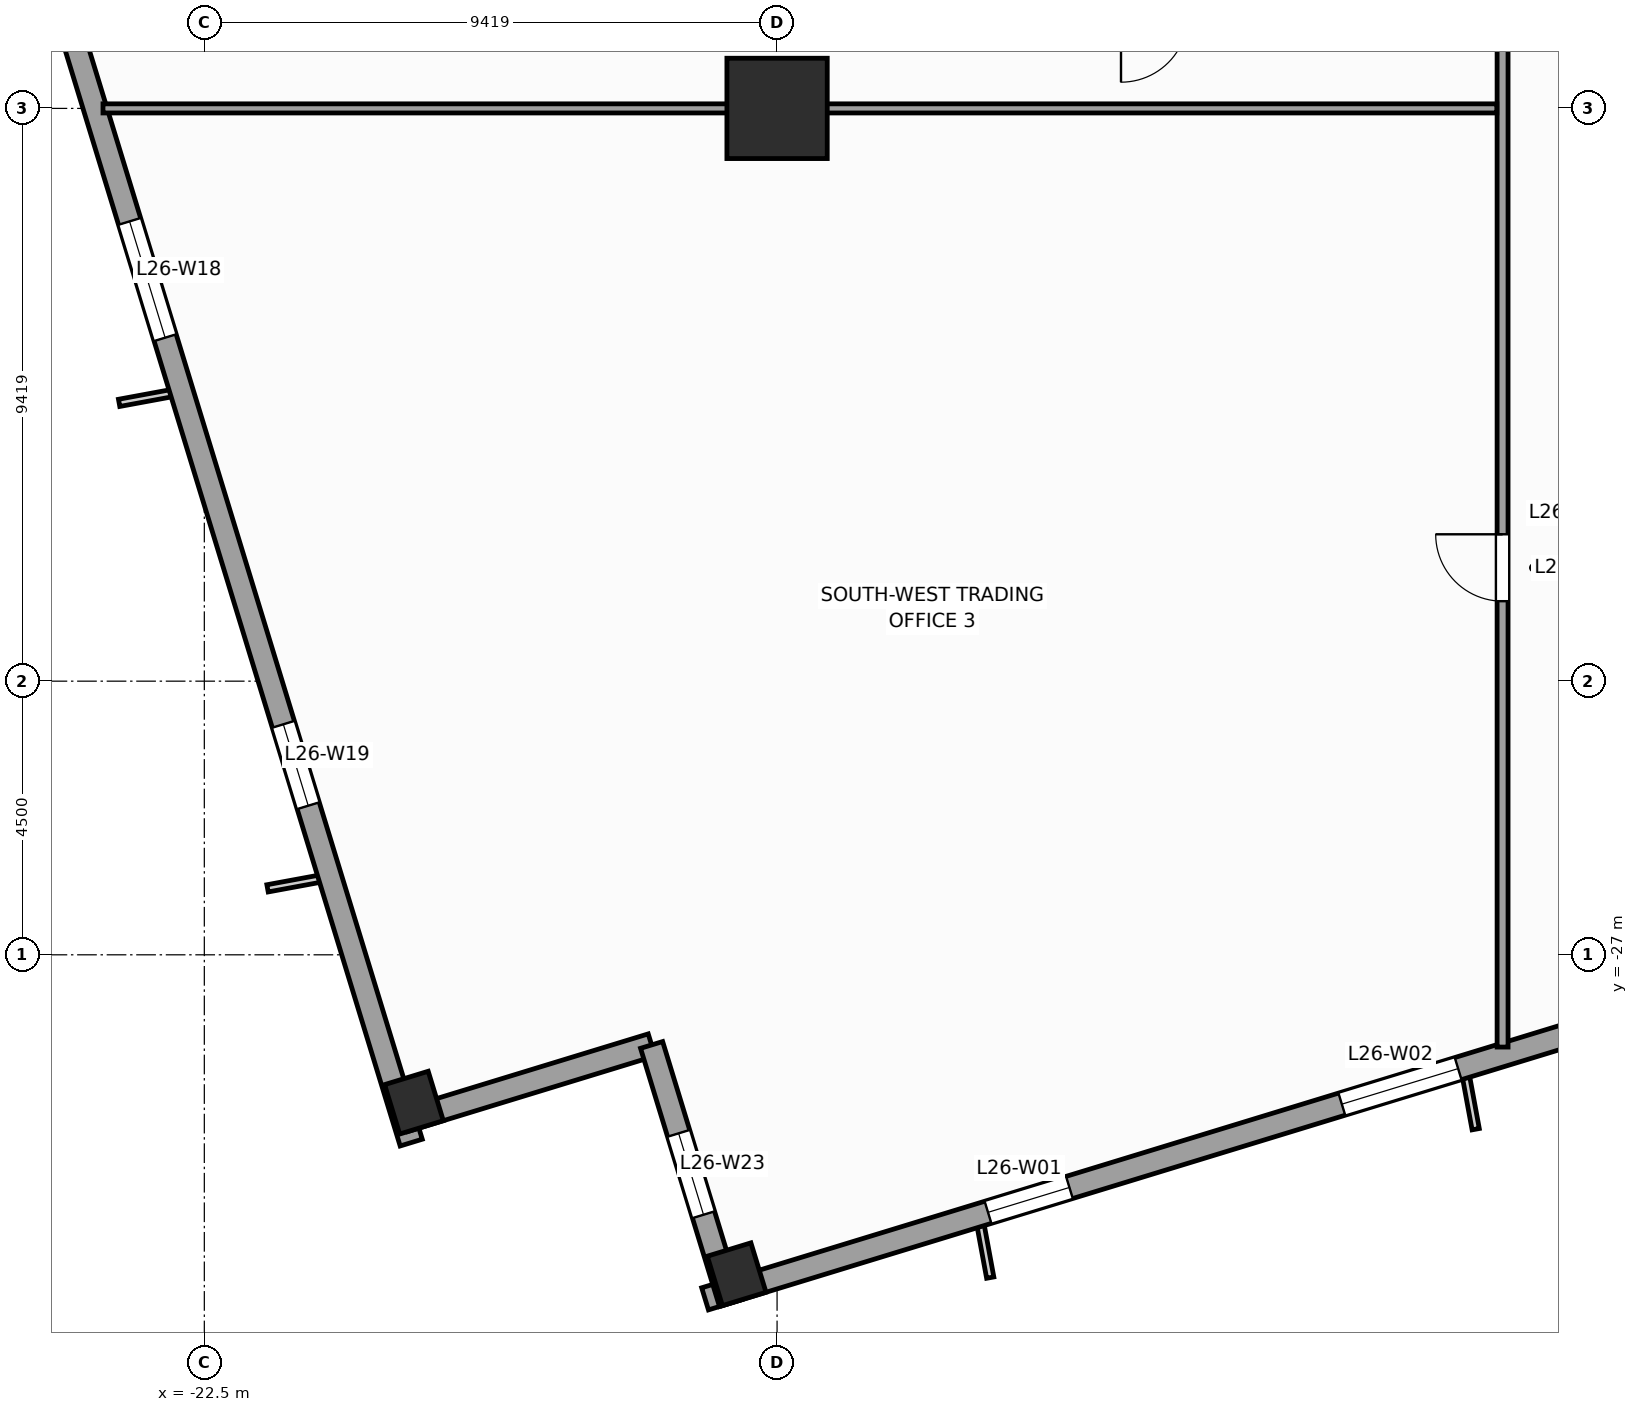
"""IFC4 building model, lengths in metres.
Left out: names, types, materials, properties, quantities, classifications, styles, units other than length and angle.
Written with IfcOpenShell. Run it as: python <this file> out.ifc"""

import sys

from ifc_helpers import new_model, si_unit, direction, frame, frame_2d, origin, origin_2d, place, context, subcontext, project, spatial, rectangle, extrude, source, transform, mapped, element, fill, save


model = new_model("IFC4")
c1 = context("Model", 3, precision=1e-05, world=origin(), true_north=direction((0.0, 1.0)))
c2 = subcontext(c1, "Body", "Model", "MODEL_VIEW")
j1 = project(units=[si_unit("LENGTHUNIT", "METRE"), si_unit("PLANEANGLEUNIT", "RADIAN")], contexts=[c1])
p1 = place(None, origin())
s1 = spatial("IfcSite", under=j1, at=p1, CompositionType="ELEMENT")
p2 = place(p1, origin())
s2 = spatial("IfcBuilding", under=s1, at=p2, CompositionType="ELEMENT")
p3 = place(p2, frame((0.0, 0.0, 111.2)))
s3 = spatial("IfcBuildingStorey", under=s2, at=p3, CompositionType="ELEMENT", Elevation=111.2)
m1 = source(origin(), c2, "Body", "SweptSolid", [
    extrude(rectangle(XDim=1.65, YDim=1.65, at=origin_2d()), origin(), (0.0, 0.0, 1.0), 4.0),
])
p4 = place(p3, frame((-13.081, -13.081, 0.0), z_axis=(0.0, 0.0, 1.0), x_axis=(1.0, 0.0, 0.0)))
e1 = element("IfcColumn", 1, at=p4, inside=s3, PredefinedType="COLUMN", context=c2, shape_type="MappedRepresentation", body=[
    mapped(m1, transform((0.0, 0.0, 0.0), scale=1.0)),
])
m2 = source(origin(), c2, "Body", "SweptSolid", [
    extrude(rectangle(XDim=0.75, YDim=0.85, at=origin_2d()), origin(), (0.0, 0.0, 1.0), 4.0),
])
for number, where, z_axis, x_axis in (
    (2, (-13.746, -32.253, 0.0), (0.0, 0.0, 1.0), (0.956, 0.292, 0.0)),
    (3, (-19.052, -29.431, 0.0), (0.0, 0.0, 1.0), (0.956, 0.292, 0.0)),
):
    element("IfcColumn", number, at=place(p3, frame(where, z_axis=z_axis, x_axis=x_axis)), inside=s3, PredefinedType="COLUMN", context=c2, shape_type="MappedRepresentation", body=[
        mapped(m2, transform((0.0, 0.0, 0.0), scale=1.0)),
    ])
p5 = place(p3, frame((-14.265, -32.658, 0.0), z_axis=(0.0, 0.0, 1.0), x_axis=(0.956304320851, 0.292373127906, 0.0)))
e4 = element("IfcWall", 4, at=p5, inside=s3, PredefinedType="STANDARD", context=c2, shape_type="SweptSolid", body=[
    extrude(rectangle(XDim=46.38, YDim=0.38, at=frame_2d((23.19, 0.0))), origin(), (0.0, 0.0, 1.0), 3.14),
])
p6 = place(p5, frame((29.115, 0.0, 0.0)))
e5 = element("IfcOpeningElement", 5, at=p6, cuts=e4, PredefinedType="OPENING", context=c2, shape_type="SweptSolid", body=[
    extrude(rectangle(XDim=1.05, YDim=2.25, at=frame_2d((0.525, 1.125))), frame((0.0, 0.2, 0.0), z_axis=(0.0, -1.0, 0.0), x_axis=(1.0, 0.0, 0.0)), (0.0, 0.0, 1.0), 0.4),
])
p7 = place(p5, frame((4.865, 0.0, 0.51)))
e6 = element("IfcOpeningElement", 6, at=p7, cuts=e4, PredefinedType="OPENING", context=c2, shape_type="SweptSolid", body=[
    extrude(rectangle(XDim=1.4, YDim=2.4, at=frame_2d((0.7, 1.2))), frame((0.0, 0.2, 0.0), z_axis=(0.0, -1.0, 0.0), x_axis=(1.0, 0.0, 0.0)), (0.0, 0.0, 1.0), 0.4),
])
p8 = place(p5, frame((10.95, 0.0, 0.51)))
e7 = element("IfcOpeningElement", 7, at=p8, cuts=e4, PredefinedType="OPENING", context=c2, shape_type="SweptSolid", body=[
    extrude(rectangle(XDim=2.0, YDim=2.4, at=frame_2d((1.0, 1.2))), frame((0.0, 0.2, 0.0), z_axis=(0.0, -1.0, 0.0), x_axis=(1.0, 0.0, 0.0)), (0.0, 0.0, 1.0), 0.4),
])
p9 = place(p5, frame((20.512, 0.0, 0.51)))
e8 = element("IfcOpeningElement", 8, at=p9, cuts=e4, PredefinedType="OPENING", context=c2, shape_type="SweptSolid", body=[
    extrude(rectangle(XDim=2.0, YDim=2.4, at=frame_2d((1.0, 1.2))), frame((0.0, 0.2, 0.0), z_axis=(0.0, -1.0, 0.0), x_axis=(1.0, 0.0, 0.0)), (0.0, 0.0, 1.0), 0.4),
])
p10 = place(p5, frame((31.288, 0.0, 0.51)))
e9 = element("IfcOpeningElement", 9, at=p10, cuts=e4, PredefinedType="OPENING", context=c2, shape_type="SweptSolid", body=[
    extrude(rectangle(XDim=2.0, YDim=2.4, at=frame_2d((1.0, 1.2))), frame((0.0, 0.2, 0.0), z_axis=(0.0, -1.0, 0.0), x_axis=(1.0, 0.0, 0.0)), (0.0, 0.0, 1.0), 0.4),
])
p11 = place(p5, frame((39.187, 0.0, 0.51)))
e10 = element("IfcOpeningElement", 10, at=p11, cuts=e4, PredefinedType="OPENING", context=c2, shape_type="SweptSolid", body=[
    extrude(rectangle(XDim=1.4, YDim=2.4, at=frame_2d((0.7, 1.2))), frame((0.0, 0.2, 0.0), z_axis=(0.0, -1.0, 0.0), x_axis=(1.0, 0.0, 0.0)), (0.0, 0.0, 1.0), 0.4),
])
p12 = place(p3, frame((-32.658, 14.265, 0.0), z_axis=(0.0, 0.0, 1.0), x_axis=(0.292373127906, -0.956304320851, 0.0)))
e11 = element("IfcWall", 11, at=p12, inside=s3, PredefinedType="STANDARD", context=c2, shape_type="SweptSolid", body=[
    extrude(rectangle(XDim=46.38, YDim=0.38, at=frame_2d((23.19, 0.0))), origin(), (0.0, 0.0, 1.0), 3.14),
])
p13 = place(p12, frame((4.865, 0.0, 0.51)))
e12 = element("IfcOpeningElement", 12, at=p13, cuts=e11, PredefinedType="OPENING", context=c2, shape_type="SweptSolid", body=[
    extrude(rectangle(XDim=1.4, YDim=2.4, at=frame_2d((0.7, 1.2))), frame((0.0, 0.2, 0.0), z_axis=(0.0, -1.0, 0.0), x_axis=(1.0, 0.0, 0.0)), (0.0, 0.0, 1.0), 0.4),
])
p14 = place(p12, frame((14.7, 0.0, 0.51)))
e13 = element("IfcOpeningElement", 13, at=p14, cuts=e11, PredefinedType="OPENING", context=c2, shape_type="SweptSolid", body=[
    extrude(rectangle(XDim=2.0, YDim=2.4, at=frame_2d((1.0, 1.2))), frame((0.0, 0.2, 0.0), z_axis=(0.0, -1.0, 0.0), x_axis=(1.0, 0.0, 0.0)), (0.0, 0.0, 1.0), 0.4),
])
p15 = place(p12, frame((19.012, 0.0, 0.51)))
e14 = element("IfcOpeningElement", 14, at=p15, cuts=e11, PredefinedType="OPENING", context=c2, shape_type="SweptSolid", body=[
    extrude(rectangle(XDim=2.0, YDim=2.4, at=frame_2d((1.0, 1.2))), frame((0.0, 0.2, 0.0), z_axis=(0.0, -1.0, 0.0), x_axis=(1.0, 0.0, 0.0)), (0.0, 0.0, 1.0), 0.4),
])
p16 = place(p12, frame((30.538, 0.0, 0.51)))
e15 = element("IfcOpeningElement", 15, at=p16, cuts=e11, PredefinedType="OPENING", context=c2, shape_type="SweptSolid", body=[
    extrude(rectangle(XDim=2.0, YDim=2.4, at=frame_2d((1.0, 1.2))), frame((0.0, 0.2, 0.0), z_axis=(0.0, -1.0, 0.0), x_axis=(1.0, 0.0, 0.0)), (0.0, 0.0, 1.0), 0.4),
])
p17 = place(p12, frame((39.187, 0.0, 0.51)))
e16 = element("IfcOpeningElement", 16, at=p17, cuts=e11, PredefinedType="OPENING", context=c2, shape_type="SweptSolid", body=[
    extrude(rectangle(XDim=1.4, YDim=2.4, at=frame_2d((0.7, 1.2))), frame((0.0, 0.2, 0.0), z_axis=(0.0, -1.0, 0.0), x_axis=(1.0, 0.0, 0.0)), (0.0, 0.0, 1.0), 0.4),
])
p18 = place(p3, frame((-19.208, -29.725, 0.0), z_axis=(0.0, 0.0, 1.0), x_axis=(0.956312764915, 0.292345507338, 0.0)))
e17 = element("IfcWall", 17, at=p18, inside=s3, PredefinedType="STANDARD", context=c2, shape_type="SweptSolid", body=[
    extrude(rectangle(XDim=4.25, YDim=0.38, at=frame_2d((2.125, 0.0))), origin(), (0.0, 0.0, 1.0), 3.74),
])
p19 = place(p3, frame((-15.144, -28.482, 0.0), z_axis=(0.0, 0.0, 1.0), x_axis=(0.292373601522, -0.956304176051, 0.0)))
e18 = element("IfcWall", 18, at=p19, inside=s3, PredefinedType="STANDARD", context=c2, shape_type="SweptSolid", body=[
    extrude(rectangle(XDim=4.44, YDim=0.38, at=frame_2d((2.22, 0.0))), origin(), (0.0, 0.0, 1.0), 3.04),
])
p20 = place(p19, frame((1.52, 0.0, 0.51)))
e19 = element("IfcOpeningElement", 19, at=p20, cuts=e18, PredefinedType="OPENING", context=c2, shape_type="SweptSolid", body=[
    extrude(rectangle(XDim=1.4, YDim=2.4, at=frame_2d((0.7, 1.2))), frame((0.0, 0.2, 0.0), z_axis=(0.0, -1.0, 0.0), x_axis=(1.0, 0.0, 0.0)), (0.0, 0.0, 1.0), 0.4),
])
p21 = place(p3, frame((-1.15, -28.517, 0.0), z_axis=(0.0, 0.0, 1.0), x_axis=(0.0, 1.0, 0.0)))
e20 = element("IfcWall", 20, at=p21, inside=s3, PredefinedType="PARTITIONING", context=c2, shape_type="SweptSolid", body=[
    extrude(rectangle(XDim=16.867, YDim=0.18, at=frame_2d((8.434, 0.0))), origin(), (0.0, 0.0, 1.0), 3.41),
])
p22 = place(p21, frame((7.333, 0.0, 0.0)))
e21 = element("IfcOpeningElement", 21, at=p22, cuts=e20, PredefinedType="OPENING", context=c2, shape_type="SweptSolid", body=[
    extrude(rectangle(XDim=1.1, YDim=2.2, at=frame_2d((0.55, 1.1))), frame((0.0, 0.1, 0.0), z_axis=(0.0, -1.0, 0.0), x_axis=(1.0, 0.0, 0.0)), (0.0, 0.0, 1.0), 0.2),
])
p23 = place(p3, frame((-24.167, -13.081, 0.0), z_axis=(0.0, 0.0, 1.0), x_axis=(1.0, 0.0, 0.0)))
e22 = element("IfcWall", 22, at=p23, inside=s3, PredefinedType="PARTITIONING", context=c2, shape_type="SweptSolid", body=[
    extrude(rectangle(XDim=22.921, YDim=0.15, at=frame_2d((11.461, 0.0))), origin(), (0.0, 0.0, 1.0), 2.732),
])
m3 = source(origin(), c2, "Body", "SweptSolid", [
    extrude(rectangle(XDim=1.4, YDim=2.4, at=frame_2d((0.7, 1.2))), frame((0.0, 0.03, 0.0), z_axis=(0.0, -1.0, 0.0), x_axis=(1.0, 0.0, 0.0)), (0.0, 0.0, 1.0), 0.06),
])
p24 = place(p7, origin())
e23 = element("IfcWindow", 23, at=p24, inside=s3, PartitioningType="SINGLE_PANEL", PredefinedType="WINDOW", context=c2, shape_type="MappedRepresentation", body=[
    mapped(m3, transform((0.0, 0.0, 0.0), scale=1.0)),
])
fill(e6, e23)
m4 = source(origin(), c2, "Body", "SweptSolid", [
    extrude(rectangle(XDim=2.0, YDim=2.4, at=frame_2d((1.0, 1.2))), frame((0.0, 0.03, 0.0), z_axis=(0.0, -1.0, 0.0), x_axis=(1.0, 0.0, 0.0)), (0.0, 0.0, 1.0), 0.06),
])
p25 = place(p8, origin())
e24 = element("IfcWindow", 24, at=p25, inside=s3, PartitioningType="SINGLE_PANEL", PredefinedType="WINDOW", context=c2, shape_type="MappedRepresentation", body=[
    mapped(m4, transform((0.0, 0.0, 0.0), scale=1.0)),
])
fill(e7, e24)
p26 = place(p16, origin())
e25 = element("IfcWindow", 25, at=p26, inside=s3, PartitioningType="SINGLE_PANEL", PredefinedType="WINDOW", context=c2, shape_type="MappedRepresentation", body=[
    mapped(m4, transform((0.0, 0.0, 0.0), scale=1.0)),
])
fill(e15, e25)
p27 = place(p17, origin())
e26 = element("IfcWindow", 26, at=p27, inside=s3, PartitioningType="SINGLE_PANEL", PredefinedType="WINDOW", context=c2, shape_type="MappedRepresentation", body=[
    mapped(m3, transform((0.0, 0.0, 0.0), scale=1.0)),
])
fill(e16, e26)
p28 = place(p20, origin())
e27 = element("IfcWindow", 27, at=p28, inside=s3, PartitioningType="SINGLE_PANEL", PredefinedType="WINDOW", context=c2, shape_type="MappedRepresentation", body=[
    mapped(m3, transform((0.0, 0.0, 0.0), scale=1.0)),
])
fill(e19, e27)
m5 = source(origin(), c2, "Body", "SweptSolid", [
    extrude(rectangle(XDim=1.1, YDim=2.2, at=frame_2d((0.55, 1.1))), frame((0.0, 0.025, 0.0), z_axis=(0.0, -1.0, 0.0), x_axis=(1.0, 0.0, 0.0)), (0.0, 0.0, 1.0), 0.05),
])
p29 = place(p22, origin())
e28 = element("IfcDoor", 28, at=p29, inside=s3, OperationType="SINGLE_SWING_RIGHT", PredefinedType="DOOR", context=c2, shape_type="MappedRepresentation", body=[
    mapped(m5, transform((0.0, 0.0, 0.0), scale=1.0)),
])
fill(e21, e28)
save(model, sys.argv[1])
